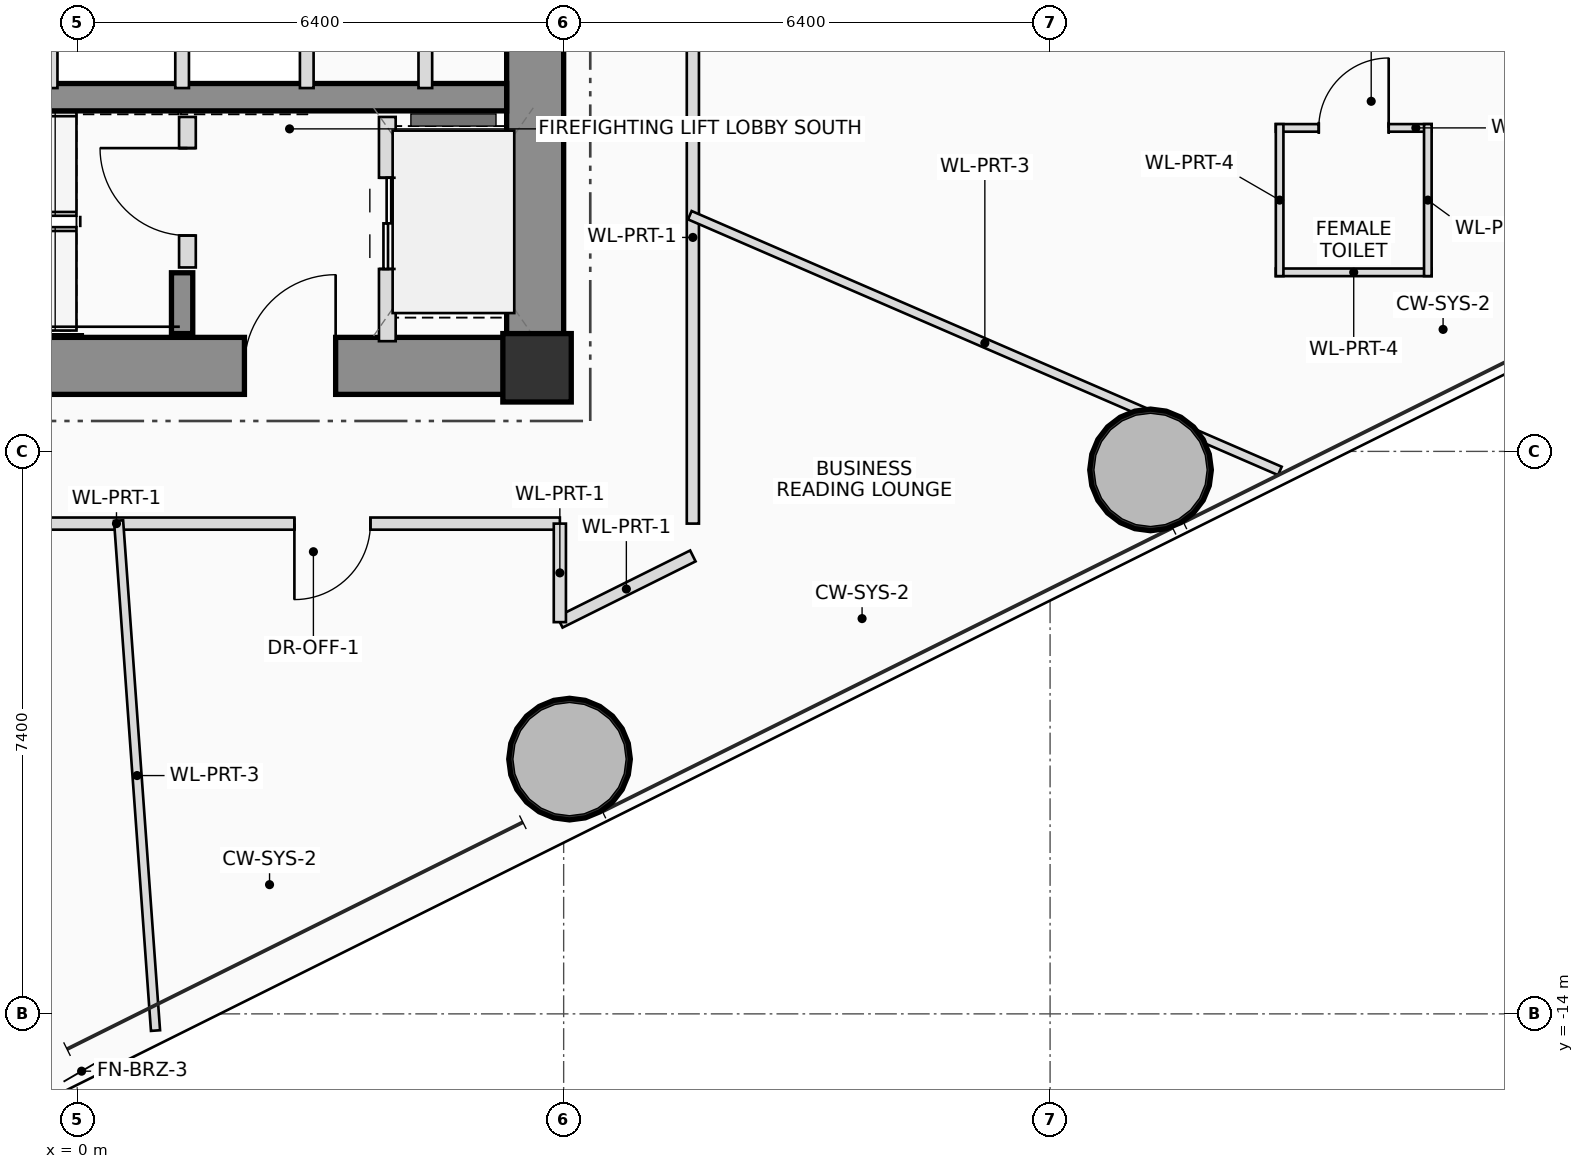
"""IFC4 building model, lengths in metres.
Left out: names, types, materials, properties, quantities, classifications, styles, units other than length and angle.
Written with IfcOpenShell. Run it as: python <this file> out.ifc"""

import sys

from ifc_helpers import new_model, si_unit, direction, frame, frame_2d, origin, origin_2d, place, context, subcontext, project, spatial, rectangle, hollow_circle, extrude, source, transform, mapped, element, fill, save


model = new_model("IFC4")
c1 = context("Model", 3, precision=1e-05, world=origin(), true_north=direction((0.0, 1.0)))
c2 = subcontext(c1, "Body", "Model", "MODEL_VIEW")
j1 = project(units=[si_unit("LENGTHUNIT", "METRE"), si_unit("PLANEANGLEUNIT", "RADIAN")], contexts=[c1])
p1 = place(None, origin())
s1 = spatial("IfcSite", under=j1, at=p1, CompositionType="ELEMENT")
p2 = place(p1, origin())
s2 = spatial("IfcBuilding", under=s1, at=p2, CompositionType="ELEMENT")
p3 = place(p2, frame((0.0, 0.0, 34.9)))
s3 = spatial("IfcBuildingStorey", under=s2, at=p3, CompositionType="ELEMENT", Elevation=34.9)
m1 = source(origin(), c2, "Body", "SweptSolid", [
    extrude(rectangle(XDim=0.9, YDim=0.9, at=origin_2d()), origin(), (0.0, 0.0, 1.0), 3.7),
])
p4 = place(p3, frame((6.05, -5.5, 0.0), z_axis=(0.0, 0.0, 1.0), x_axis=(1.0, 0.0, 0.0)))
e1 = element("IfcColumn", 1, at=p4, inside=s3, PredefinedType="COLUMN", context=c2, shape_type="MappedRepresentation", body=[
    mapped(m1, transform((0.0, 0.0, 0.0), scale=1.0)),
])
p5 = place(p3, frame((-6.4, -5.475, 0.0), z_axis=(0.0, 0.0, 1.0), x_axis=(1.0, 0.0, 0.0)))
e2 = element("IfcWall", 2, at=p5, inside=s3, PredefinedType="SHEAR", context=c2, shape_type="SweptSolid", body=[
    extrude(rectangle(XDim=12.8, YDim=0.75, at=frame_2d((6.4, 0.0))), origin(), (0.0, 0.0, 1.0), 3.7),
])
p6 = place(p5, frame((8.6, 0.0, 0.0)))
e3 = element("IfcOpeningElement", 3, at=p6, cuts=e2, PredefinedType="OPENING", context=c2, shape_type="SweptSolid", body=[
    extrude(rectangle(XDim=1.2, YDim=2.2, at=frame_2d((0.6, 1.1))), frame((0.0, 0.385, 0.0), z_axis=(0.0, -1.0, 0.0), x_axis=(1.0, 0.0, 0.0)), (0.0, 0.0, 1.0), 0.77),
])
p7 = place(p3, frame((6.025, -5.1, 0.0), z_axis=(0.0, 0.0, 1.0), x_axis=(0.0, 1.0, 0.0)))
e4 = element("IfcWall", 4, at=p7, inside=s3, PredefinedType="SHEAR", context=c2, shape_type="SweptSolid", body=[
    extrude(rectangle(XDim=10.2, YDim=0.75, at=frame_2d((5.1, 0.0))), origin(), (0.0, 0.0, 1.0), 3.7),
])
p8 = place(p3, frame((-5.65, -1.94, 0.0), z_axis=(0.0, 0.0, 1.0), x_axis=(1.0, 0.0, 0.0)))
e5 = element("IfcWall", 5, at=p8, inside=s3, PredefinedType="SHEAR", context=c2, shape_type="SweptSolid", body=[
    extrude(rectangle(XDim=11.3, YDim=0.36, at=frame_2d((5.65, 0.0))), origin(), (0.0, 0.0, 1.0), 3.7),
])
p9 = place(p3, frame((1.38, -5.05, 0.0), z_axis=(0.0, 0.0, 1.0), x_axis=(0.0, 1.0, 0.0)))
e6 = element("IfcWall", 6, at=p9, inside=s3, PredefinedType="SHEAR", context=c2, shape_type="SweptSolid", body=[
    extrude(rectangle(XDim=0.8, YDim=0.28, at=frame_2d((0.4, 0.0))), origin(), (0.0, 0.0, 1.0), 3.7),
])
m2 = source(origin(), c2, "Body", "SweptSolid", [
    extrude(hollow_circle(Radius=0.8, WallThickness=0.055, at=origin_2d()), origin(), (0.0, 0.0, 1.0), 3.7),
])
for number, where, z_axis, x_axis in (
    (7, (6.477, -10.648, 0.0), (0.0, 0.0, 1.0), (1.0, 0.0, 0.0)),
    (8, (14.122, -6.844, 0.0), (0.0, 0.0, 1.0), (1.0, 0.0, 0.0)),
):
    element("IfcColumn", number, at=place(p3, frame(where, z_axis=z_axis, x_axis=x_axis)), inside=s3, PredefinedType="COLUMN", context=c2, shape_type="MappedRepresentation", body=[
        mapped(m2, transform((0.0, 0.0, 0.0), scale=1.0)),
    ])
p10 = place(p3, frame((1.45, -4.18, 0.0), z_axis=(0.0, 0.0, 1.0), x_axis=(0.0, 1.0, 0.0)))
e9 = element("IfcWall", 9, at=p10, inside=s3, PredefinedType="PLUMBINGWALL", context=c2, shape_type="SweptSolid", body=[
    extrude(rectangle(XDim=1.98, YDim=0.22, at=frame_2d((0.99, 0.0))), origin(), (0.0, 0.0, 1.0), 3.495),
])
p11 = place(p10, frame((0.42, 0.0, 0.0)))
e10 = element("IfcOpeningElement", 10, at=p11, cuts=e9, PredefinedType="OPENING", context=c2, shape_type="SweptSolid", body=[
    extrude(rectangle(XDim=1.15, YDim=2.15, at=frame_2d((0.575, 1.075))), frame((0.0, 0.12, 0.0), z_axis=(0.0, -1.0, 0.0), x_axis=(1.0, 0.0, 0.0)), (0.0, 0.0, 1.0), 0.24),
])
p12 = place(p3, frame((4.08, -5.15, 0.0), z_axis=(0.0, 0.0, 1.0), x_axis=(0.0, 1.0, 0.0)))
e11 = element("IfcWall", 11, at=p12, inside=s3, PredefinedType="PLUMBINGWALL", context=c2, shape_type="SweptSolid", body=[
    extrude(rectangle(XDim=2.95, YDim=0.22, at=frame_2d((1.475, 0.0))), origin(), (0.0, 0.0, 1.0), 3.495),
])
p13 = place(p12, frame((0.95, 0.0, 0.0)))
e12 = element("IfcOpeningElement", 12, at=p13, cuts=e11, PredefinedType="OPENING", context=c2, shape_type="SweptSolid", body=[
    extrude(rectangle(XDim=1.2, YDim=2.25, at=frame_2d((0.6, 1.125))), frame((0.0, 0.12, 0.0), z_axis=(0.0, -1.0, 0.0), x_axis=(1.0, 0.0, 0.0)), (0.0, 0.0, 1.0), 0.24),
])
for number, where, z_axis, x_axis in (
    (13, (-0.35, -1.82, 0.0), (0.0, 0.0, 1.0), (0.0, 1.0, 0.0)),
    (14, (1.38, -1.82, 0.0), (0.0, 0.0, 1.0), (0.0, 1.0, 0.0)),
    (15, (3.02, -1.82, 0.0), (0.0, 0.0, 1.0), (0.0, 1.0, 0.0)),
):
    element("IfcWall", number, at=place(p3, frame(where, z_axis=z_axis, x_axis=x_axis)), inside=s3, PredefinedType="PLUMBINGWALL", context=c2, shape_type="SweptSolid", body=[
        extrude(rectangle(XDim=0.98, YDim=0.18, at=frame_2d((0.49, 0.0))), origin(), (0.0, 0.0, 1.0), 3.495),
    ])
p14 = place(p3, frame((4.58, -1.82, 0.0), z_axis=(0.0, 0.0, 1.0), x_axis=(0.0, 1.0, 0.0)))
e16 = element("IfcWall", 16, at=p14, inside=s3, PredefinedType="PLUMBINGWALL", context=c2, shape_type="SweptSolid", body=[
    extrude(rectangle(XDim=3.64, YDim=0.18, at=frame_2d((1.82, 0.0))), origin(), (0.0, 0.0, 1.0), 3.495),
])
p15 = place(p14, frame((1.35, 0.0, 0.0)))
e17 = element("IfcOpeningElement", 17, at=p15, cuts=e16, PredefinedType="OPENING", context=c2, shape_type="SweptSolid", body=[
    extrude(rectangle(XDim=0.9, YDim=2.05, at=frame_2d((0.45, 1.025))), frame((0.0, 0.1, 0.0), z_axis=(0.0, -1.0, 0.0), x_axis=(1.0, 0.0, 0.0)), (0.0, 0.0, 1.0), 0.2),
])
p16 = place(p3, frame((15.77, -2.344, 0.0), z_axis=(0.0, 0.0, 1.0), x_axis=(1.0, 0.0, 0.0)))
e18 = element("IfcWall", 18, at=p16, inside=s3, PredefinedType="PARTITIONING", context=c2, shape_type="SweptSolid", body=[
    extrude(rectangle(XDim=2.05, YDim=0.1, at=frame_2d((1.025, 0.0))), origin(), (0.0, 0.0, 1.0), 3.15),
])
p17 = place(p16, frame((0.565, 0.0, 0.0)))
e19 = element("IfcOpeningElement", 19, at=p17, cuts=e18, PredefinedType="OPENING", context=c2, shape_type="SweptSolid", body=[
    extrude(rectangle(XDim=0.92, YDim=2.1, at=frame_2d((0.46, 1.05))), frame((0.0, 0.06, 0.0), z_axis=(0.0, -1.0, 0.0), x_axis=(1.0, 0.0, 0.0)), (0.0, 0.0, 1.0), 0.12),
])
p18 = place(p3, frame((17.82, -4.244, 0.0), z_axis=(0.0, 0.0, 1.0), x_axis=(-1.0, 0.0, 0.0)))
e20 = element("IfcWall", 20, at=p18, inside=s3, PredefinedType="PARTITIONING", context=c2, shape_type="SweptSolid", body=[
    extrude(rectangle(XDim=2.05, YDim=0.1, at=frame_2d((1.025, 0.0))), origin(), (0.0, 0.0, 1.0), 3.495),
])
for number, where, z_axis, x_axis in (
    (21, (17.77, -2.294, 0.0), (0.0, 0.0, 1.0), (0.0, -1.0, 0.0)),
    (22, (15.82, -4.294, 0.0), (0.0, 0.0, 1.0), (0.0, 1.0, 0.0)),
):
    element("IfcWall", number, at=place(p3, frame(where, z_axis=z_axis, x_axis=x_axis)), inside=s3, PredefinedType="PARTITIONING", context=c2, shape_type="SweptSolid", body=[
        extrude(rectangle(XDim=2.0, YDim=0.1, at=frame_2d((1.0, 0.0))), origin(), (0.0, 0.0, 1.0), 2.8),
    ])
p19 = place(p3, frame((6.35, -7.55, 0.0), z_axis=(0.0, 0.0, 1.0), x_axis=(-1.0, 0.0, 0.0)))
e23 = element("IfcWall", 23, at=p19, inside=s3, PredefinedType="PARTITIONING", context=c2, shape_type="SweptSolid", body=[
    extrude(rectangle(XDim=12.7, YDim=0.16, at=frame_2d((6.35, 0.0))), origin(), (0.0, 0.0, 1.0), 2.8),
])
p20 = place(p19, frame((2.493, 0.0, 0.0)))
e24 = element("IfcOpeningElement", 24, at=p20, cuts=e23, PredefinedType="OPENING", context=c2, shape_type="SweptSolid", body=[
    extrude(rectangle(XDim=1.0, YDim=2.25, at=frame_2d((0.5, 1.125))), frame((0.0, 0.09, 0.0), z_axis=(0.0, -1.0, 0.0), x_axis=(1.0, 0.0, 0.0)), (0.0, 0.0, 1.0), 0.18),
])
p21 = place(p19, frame((8.175, 0.0, 0.0)))
e25 = element("IfcOpeningElement", 25, at=p21, cuts=e23, PredefinedType="OPENING", context=c2, shape_type="SweptSolid", body=[
    extrude(rectangle(XDim=1.0, YDim=2.25, at=frame_2d((0.5, 1.125))), frame((0.0, 0.09, 0.0), z_axis=(0.0, -1.0, 0.0), x_axis=(1.0, 0.0, 0.0)), (0.0, 0.0, 1.0), 0.18),
])
p22 = place(p3, frame((8.1, -0.02, 0.0), z_axis=(0.0, 0.0, 1.0), x_axis=(0.0, -1.0, 0.0)))
e26 = element("IfcWall", 26, at=p22, inside=s3, PredefinedType="PARTITIONING", context=c2, shape_type="SweptSolid", body=[
    extrude(rectangle(XDim=7.53, YDim=0.16, at=frame_2d((3.765, 0.0))), origin(), (0.0, 0.0, 1.0), 2.8),
])
p23 = place(p3, frame((8.1, -7.975, 0.0), z_axis=(0.0, 0.0, 1.0), x_axis=(-0.89527489017, -0.445514164793, 0.0)))
e27 = element("IfcWall", 27, at=p23, inside=s3, PredefinedType="PARTITIONING", context=c2, shape_type="SweptSolid", body=[
    extrude(rectangle(XDim=1.955, YDim=0.16, at=frame_2d((0.977, 0.0))), origin(), (0.0, 0.0, 1.0), 2.8),
])
p24 = place(p3, frame((6.35, -8.846, 0.0), z_axis=(0.0, 0.0, 1.0), x_axis=(0.0, 1.0, 0.0)))
e28 = element("IfcWall", 28, at=p24, inside=s3, PredefinedType="PARTITIONING", context=c2, shape_type="SweptSolid", body=[
    extrude(rectangle(XDim=1.296, YDim=0.16, at=frame_2d((0.648, 0.0))), origin(), (0.0, 0.0, 1.0), 2.8),
])
p25 = place(p3, frame((0.544, -7.51, 0.0), z_axis=(0.0, 0.0, 1.0), x_axis=(0.072255425025, -0.997386160699, 0.0)))
e29 = element("IfcWall", 29, at=p25, inside=s3, PredefinedType="PARTITIONING", context=c2, shape_type="SweptSolid", body=[
    extrude(rectangle(XDim=6.727, YDim=0.12, at=frame_2d((3.364, 0.0))), origin(), (0.0, 0.0, 1.0), 2.96),
])
p26 = place(p3, frame((8.06, -3.493, 0.0), z_axis=(0.0, 0.0, 1.0), x_axis=(0.917561590562, -0.397593671385, 0.0)))
e30 = element("IfcWall", 30, at=p26, inside=s3, PredefinedType="PARTITIONING", context=c2, shape_type="SweptSolid", body=[
    extrude(rectangle(XDim=8.461, YDim=0.12, at=frame_2d((4.23, 0.0))), origin(), (0.0, 0.0, 1.0), 2.8),
])
p27 = place(p6, origin())
e31 = element("IfcDoor", 31, at=p27, inside=s3, OperationType="SINGLE_SWING_RIGHT", PredefinedType="DOOR", context=c2, shape_type="SweptSolid", body=[
    extrude(rectangle(XDim=1.2, YDim=2.2, at=frame_2d((0.6, 1.1))), frame((0.0, 0.025, 0.0), z_axis=(0.0, -1.0, 0.0), x_axis=(1.0, 0.0, 0.0)), (0.0, 0.0, 1.0), 0.05),
])
fill(e3, e31)
p28 = place(p11, origin())
e32 = element("IfcDoor", 32, at=p28, inside=s3, OperationType="SINGLE_SWING_RIGHT", PredefinedType="DOOR", context=c2, shape_type="SweptSolid", body=[
    extrude(rectangle(XDim=1.15, YDim=2.15, at=frame_2d((0.575, 1.075))), frame((0.0, 0.025, 0.0), z_axis=(0.0, -1.0, 0.0), x_axis=(1.0, 0.0, 0.0)), (0.0, 0.0, 1.0), 0.05),
])
fill(e10, e32)
p29 = place(p13, origin())
e33 = element("IfcDoor", 33, at=p29, inside=s3, OperationType="DOUBLE_DOOR_SLIDING", PredefinedType="DOOR", context=c2, shape_type="SweptSolid", body=[
    extrude(rectangle(XDim=1.2, YDim=2.25, at=frame_2d((0.6, 1.125))), frame((0.0, 0.025, 0.0), z_axis=(0.0, -1.0, 0.0), x_axis=(1.0, 0.0, 0.0)), (0.0, 0.0, 1.0), 0.05),
])
fill(e12, e33)
p30 = place(p17, origin())
e34 = element("IfcDoor", 34, at=p30, inside=s3, OperationType="SINGLE_SWING_RIGHT", PredefinedType="DOOR", context=c2, shape_type="SweptSolid", body=[
    extrude(rectangle(XDim=0.92, YDim=2.1, at=frame_2d((0.46, 1.05))), frame((0.0, 0.025, 0.0), z_axis=(0.0, -1.0, 0.0), x_axis=(1.0, 0.0, 0.0)), (0.0, 0.0, 1.0), 0.05),
])
fill(e19, e34)
p31 = place(p20, origin())
e35 = element("IfcDoor", 35, at=p31, inside=s3, OperationType="SINGLE_SWING_RIGHT", PredefinedType="DOOR", context=c2, shape_type="SweptSolid", body=[
    extrude(rectangle(XDim=1.0, YDim=2.25, at=frame_2d((0.5, 1.125))), frame((0.0, 0.025, 0.0), z_axis=(0.0, -1.0, 0.0), x_axis=(1.0, 0.0, 0.0)), (0.0, 0.0, 1.0), 0.05),
])
fill(e24, e35)
save(model, sys.argv[1])
